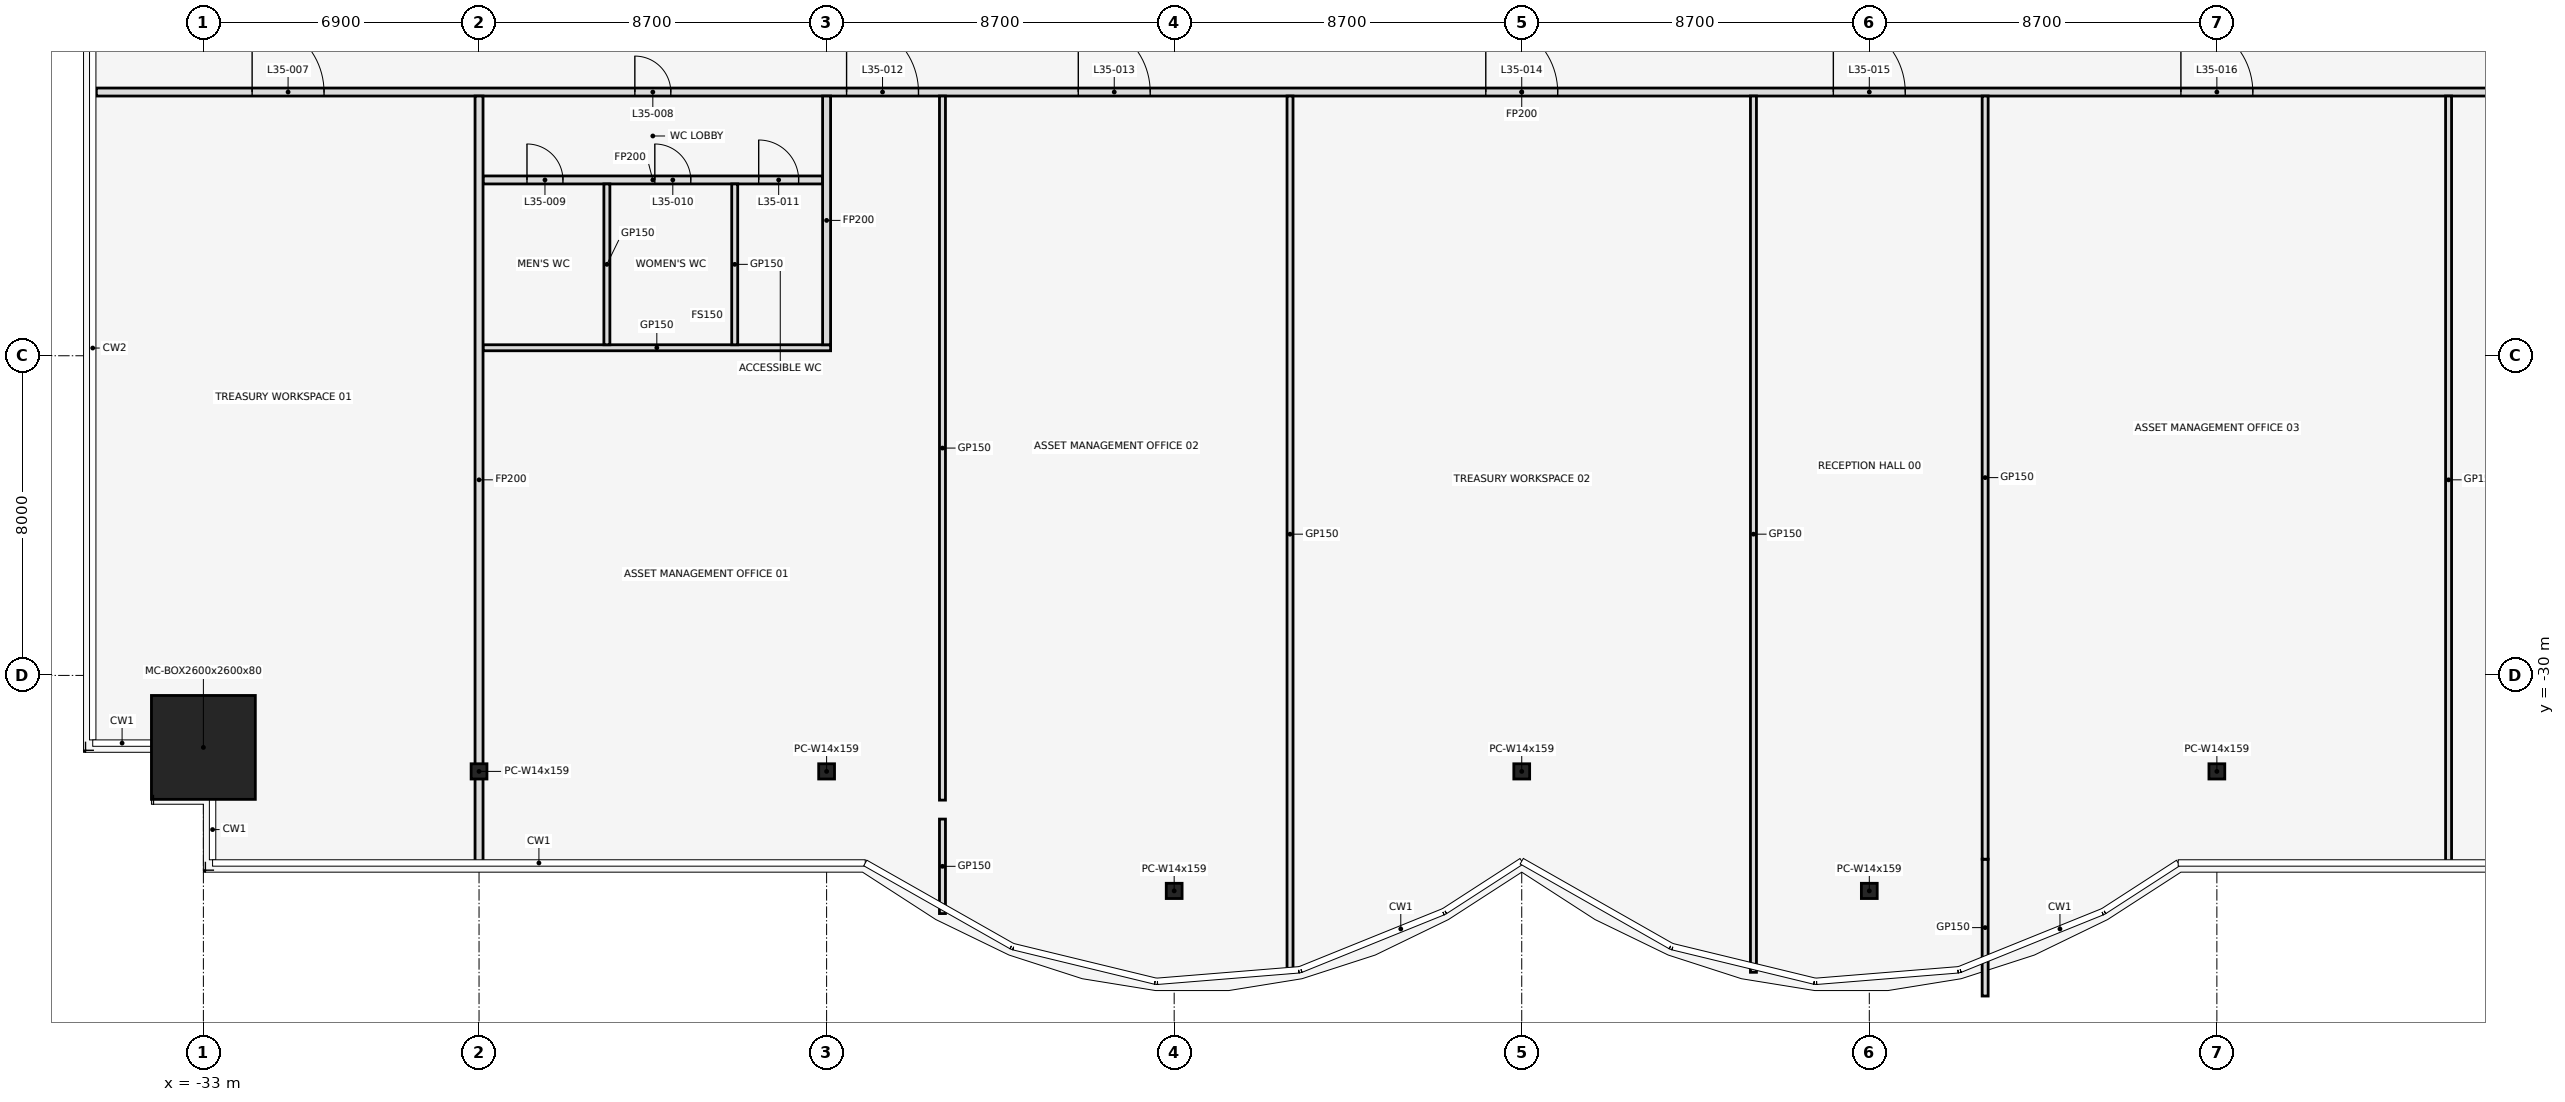
"""IFC4 building model, lengths in metres.
Left out: names, types, materials, properties, quantities, classifications, styles, units other than length and angle.
Written with IfcOpenShell. Run it as: python <this file> out.ifc"""

import sys

from ifc_helpers import new_model, si_unit, direction, frame, frame_2d, origin, origin_2d, place, context, subcontext, project, spatial, rectangle, hollow_rectangle, i_section, extrude, element, fill, save


model = new_model("IFC4")
c1 = context("Model", 3, precision=1e-05, world=origin(), true_north=direction((0.0, 1.0)))
c2 = subcontext(c1, "Body", "Model", "MODEL_VIEW")
j1 = project(units=[si_unit("LENGTHUNIT", "METRE"), si_unit("PLANEANGLEUNIT", "RADIAN")], contexts=[c1])
p1 = place(None, origin())
s1 = spatial("IfcSite", under=j1, at=p1, CompositionType="ELEMENT")
p2 = place(p1, origin())
s2 = spatial("IfcBuilding", under=s1, at=p2, CompositionType="ELEMENT")
p3 = place(p2, frame((0.0, 0.0, 160.9)))
s3 = spatial("IfcBuildingStorey", under=s2, at=p3, CompositionType="ELEMENT", Elevation=160.9)
p4 = place(p3, frame((-33.0, -31.802, 0.0), z_axis=(0.0, 0.0, 1.0), x_axis=(1.0, 0.0, 0.0)))
e1 = element("IfcColumn", 1, at=p4, inside=s3, PredefinedType="COLUMN", context=c2, shape_type="SweptSolid", body=[
    extrude(hollow_rectangle(XDim=2.6, YDim=2.6, WallThickness=0.08, at=origin_2d()), origin(), (0.0, 0.0, 1.0), 4.1),
])
for number, where, z_axis, x_axis in (
    (2, (-26.1, -32.402, 0.0), (0.0, 0.0, 1.0), (1.0, 0.0, 0.0)),
    (3, (-17.4, -32.402, 0.0), (0.0, 0.0, 1.0), (1.0, 0.0, 0.0)),
    (4, (-8.7, -35.393, 0.0), (0.0, 0.0, 1.0), (1.0, 0.0, 0.0)),
    (5, (0.0, -32.402, 0.0), (0.0, 0.0, 1.0), (1.0, 0.0, 0.0)),
    (6, (8.7, -35.393, 0.0), (0.0, 0.0, 1.0), (1.0, 0.0, 0.0)),
    (7, (17.4, -32.402, 0.0), (0.0, 0.0, 1.0), (1.0, 0.0, 0.0)),
):
    element("IfcColumn", number, at=place(p3, frame(where, z_axis=z_axis, x_axis=x_axis)), inside=s3, PredefinedType="COLUMN", context=c2, shape_type="SweptSolid", body=[
        extrude(i_section(OverallWidth=0.396, OverallDepth=0.381, WebThickness=0.019, FlangeThickness=0.03, at=origin_2d()), origin(), (0.0, 0.0, 1.0), 4.1),
    ])
p5 = place(p3, frame((-26.0, -21.8, 0.0), z_axis=(0.0, 0.0, 1.0), x_axis=(1.0, 0.0, 0.0)))
e8 = element("IfcWall", 8, at=p5, inside=s3, PredefinedType="PARTITIONING", context=c2, shape_type="SweptSolid", body=[
    extrude(rectangle(XDim=8.7, YDim=0.15, at=frame_2d((4.35, 0.0))), origin(), (0.0, 0.0, 1.0), 2.841),
])
p6 = place(p3, frame((-26.0, -17.6, 0.0), z_axis=(0.0, 0.0, 1.0), x_axis=(1.0, 0.0, 0.0)))
e9 = element("IfcWall", 9, at=p6, inside=s3, PredefinedType="PARTITIONING", context=c2, shape_type="SweptSolid", body=[
    extrude(rectangle(XDim=8.5, YDim=0.2, at=frame_2d((4.25, 0.0))), origin(), (0.0, 0.0, 1.0), 2.841),
])
p7 = place(p6, frame((1.1, 0.0, 0.0)))
e10 = element("IfcOpeningElement", 10, at=p7, cuts=e9, PredefinedType="OPENING", context=c2, shape_type="SweptSolid", body=[
    extrude(rectangle(XDim=0.9, YDim=2.1, at=frame_2d((0.45, 1.05))), frame((0.0, 0.112, 0.0), z_axis=(0.0, -1.0, 0.0), x_axis=(1.0, 0.0, 0.0)), (0.0, 0.0, 1.0), 0.224),
])
p8 = place(p6, frame((4.3, 0.0, 0.0)))
e11 = element("IfcOpeningElement", 11, at=p8, cuts=e9, PredefinedType="OPENING", context=c2, shape_type="SweptSolid", body=[
    extrude(rectangle(XDim=0.9, YDim=2.1, at=frame_2d((0.45, 1.05))), frame((0.0, 0.112, 0.0), z_axis=(0.0, -1.0, 0.0), x_axis=(1.0, 0.0, 0.0)), (0.0, 0.0, 1.0), 0.224),
])
p9 = place(p6, frame((6.9, 0.0, 0.0)))
e12 = element("IfcOpeningElement", 12, at=p9, cuts=e9, PredefinedType="OPENING", context=c2, shape_type="SweptSolid", body=[
    extrude(rectangle(XDim=1.0, YDim=2.1, at=frame_2d((0.5, 1.05))), frame((0.0, 0.112, 0.0), z_axis=(0.0, -1.0, 0.0), x_axis=(1.0, 0.0, 0.0)), (0.0, 0.0, 1.0), 0.224),
])
p10 = place(p3, frame((-35.68, -15.4, 0.0), z_axis=(0.0, 0.0, 1.0), x_axis=(1.0, 0.0, 0.0)))
e13 = element("IfcWall", 13, at=p10, inside=s3, PredefinedType="PARTITIONING", context=c2, shape_type="SweptSolid", body=[
    extrude(rectangle(XDim=71.36, YDim=0.2, at=frame_2d((35.68, 0.0))), origin(), (0.0, 0.0, 1.0), 2.841),
])
p11 = place(p10, frame((3.9, 0.0, 0.0)))
e14 = element("IfcOpeningElement", 14, at=p11, cuts=e13, PredefinedType="OPENING", context=c2, shape_type="SweptSolid", body=[
    extrude(rectangle(XDim=1.8, YDim=2.1, at=frame_2d((0.9, 1.05))), frame((0.0, 0.112, 0.0), z_axis=(0.0, -1.0, 0.0), x_axis=(1.0, 0.0, 0.0)), (0.0, 0.0, 1.0), 0.224),
])
p12 = place(p10, frame((13.48, 0.0, 0.0)))
e15 = element("IfcOpeningElement", 15, at=p12, cuts=e13, PredefinedType="OPENING", context=c2, shape_type="SweptSolid", body=[
    extrude(rectangle(XDim=0.9, YDim=2.1, at=frame_2d((0.45, 1.05))), frame((0.0, 0.112, 0.0), z_axis=(0.0, -1.0, 0.0), x_axis=(1.0, 0.0, 0.0)), (0.0, 0.0, 1.0), 0.224),
])
p13 = place(p10, frame((18.78, 0.0, 0.0)))
e16 = element("IfcOpeningElement", 16, at=p13, cuts=e13, PredefinedType="OPENING", context=c2, shape_type="SweptSolid", body=[
    extrude(rectangle(XDim=1.8, YDim=2.1, at=frame_2d((0.9, 1.05))), frame((0.0, 0.112, 0.0), z_axis=(0.0, -1.0, 0.0), x_axis=(1.0, 0.0, 0.0)), (0.0, 0.0, 1.0), 0.224),
])
p14 = place(p10, frame((24.58, 0.0, 0.0)))
e17 = element("IfcOpeningElement", 17, at=p14, cuts=e13, PredefinedType="OPENING", context=c2, shape_type="SweptSolid", body=[
    extrude(rectangle(XDim=1.8, YDim=2.1, at=frame_2d((0.9, 1.05))), frame((0.0, 0.112, 0.0), z_axis=(0.0, -1.0, 0.0), x_axis=(1.0, 0.0, 0.0)), (0.0, 0.0, 1.0), 0.224),
])
p15 = place(p10, frame((34.78, 0.0, 0.0)))
e18 = element("IfcOpeningElement", 18, at=p15, cuts=e13, PredefinedType="OPENING", context=c2, shape_type="SweptSolid", body=[
    extrude(rectangle(XDim=1.8, YDim=2.1, at=frame_2d((0.9, 1.05))), frame((0.0, 0.112, 0.0), z_axis=(0.0, -1.0, 0.0), x_axis=(1.0, 0.0, 0.0)), (0.0, 0.0, 1.0), 0.224),
])
p16 = place(p10, frame((43.48, 0.0, 0.0)))
e19 = element("IfcOpeningElement", 19, at=p16, cuts=e13, PredefinedType="OPENING", context=c2, shape_type="SweptSolid", body=[
    extrude(rectangle(XDim=1.8, YDim=2.1, at=frame_2d((0.9, 1.05))), frame((0.0, 0.112, 0.0), z_axis=(0.0, -1.0, 0.0), x_axis=(1.0, 0.0, 0.0)), (0.0, 0.0, 1.0), 0.224),
])
p17 = place(p10, frame((52.18, 0.0, 0.0)))
e20 = element("IfcOpeningElement", 20, at=p17, cuts=e13, PredefinedType="OPENING", context=c2, shape_type="SweptSolid", body=[
    extrude(rectangle(XDim=1.8, YDim=2.1, at=frame_2d((0.9, 1.05))), frame((0.0, 0.112, 0.0), z_axis=(0.0, -1.0, 0.0), x_axis=(1.0, 0.0, 0.0)), (0.0, 0.0, 1.0), 0.224),
])
p18 = place(p10, frame((64.18, 0.0, 0.0)))
e21 = element("IfcOpeningElement", 21, at=p18, cuts=e13, PredefinedType="OPENING", context=c2, shape_type="SweptSolid", body=[
    extrude(rectangle(XDim=1.8, YDim=2.1, at=frame_2d((0.9, 1.05))), frame((0.0, 0.112, 0.0), z_axis=(0.0, -1.0, 0.0), x_axis=(1.0, 0.0, 0.0)), (0.0, 0.0, 1.0), 0.224),
])
p19 = place(p3, frame((-26.1, -34.71, 0.0), z_axis=(0.0, 0.0, 1.0), x_axis=(0.0, 1.0, 0.0)))
e22 = element("IfcWall", 22, at=p19, inside=s3, PredefinedType="PARTITIONING", context=c2, shape_type="SweptSolid", body=[
    extrude(rectangle(XDim=19.21, YDim=0.2, at=frame_2d((9.605, 0.0))), origin(), (0.0, 0.0, 1.0), 2.841),
])
for number, where, z_axis, x_axis in (
    (23, (-22.9, -21.725, 0.0), (0.0, 0.0, 1.0), (0.0, 1.0, 0.0)),
    (24, (-19.7, -21.725, 0.0), (0.0, 0.0, 1.0), (0.0, 1.0, 0.0)),
):
    element("IfcWall", number, at=place(p3, frame(where, z_axis=z_axis, x_axis=x_axis)), inside=s3, PredefinedType="PARTITIONING", context=c2, shape_type="SweptSolid", body=[
        extrude(rectangle(XDim=4.025, YDim=0.15, at=frame_2d((2.013, 0.0))), origin(), (0.0, 0.0, 1.0), 2.841),
    ])
p20 = place(p3, frame((-17.4, -21.725, 0.0), z_axis=(0.0, 0.0, 1.0), x_axis=(0.0, 1.0, 0.0)))
e25 = element("IfcWall", 25, at=p20, inside=s3, PredefinedType="PARTITIONING", context=c2, shape_type="SweptSolid", body=[
    extrude(rectangle(XDim=6.225, YDim=0.2, at=frame_2d((3.113, 0.0))), origin(), (0.0, 0.0, 1.0), 2.841),
])
p21 = place(p3, frame((-14.5, -35.96, 0.0), z_axis=(0.0, 0.0, 1.0), x_axis=(0.0, 1.0, 0.0)))
e26 = element("IfcWall", 26, at=p21, inside=s3, PredefinedType="PARTITIONING", context=c2, shape_type="SweptSolid", body=[
    extrude(rectangle(XDim=2.364, YDim=0.15, at=frame_2d((1.182, 0.0))), origin(), (0.0, 0.0, 1.0), 2.841),
])
p22 = place(p3, frame((-14.5, -33.121, 0.0), z_axis=(0.0, 0.0, 1.0), x_axis=(0.0, 1.0, 0.0)))
e27 = element("IfcWall", 27, at=p22, inside=s3, PredefinedType="PARTITIONING", context=c2, shape_type="SweptSolid", body=[
    extrude(rectangle(XDim=17.621, YDim=0.15, at=frame_2d((8.811, 0.0))), origin(), (0.0, 0.0, 1.0), 2.841),
])
for number, where, z_axis, x_axis in (
    (28, (-5.8, -37.43, 0.0), (0.0, 0.0, 1.0), (0.0, 1.0, 0.0)),
    (29, (5.8, -37.43, 0.0), (0.0, 0.0, 1.0), (0.0, 1.0, 0.0)),
):
    element("IfcWall", number, at=place(p3, frame(where, z_axis=z_axis, x_axis=x_axis)), inside=s3, PredefinedType="PARTITIONING", context=c2, shape_type="SweptSolid", body=[
        extrude(rectangle(XDim=21.93, YDim=0.15, at=frame_2d((10.965, 0.0))), origin(), (0.0, 0.0, 1.0), 2.841),
    ])
p23 = place(p3, frame((11.6, -38.024, 0.0), z_axis=(0.0, 0.0, 1.0), x_axis=(0.0, 1.0, 0.0)))
e30 = element("IfcWall", 30, at=p23, inside=s3, PredefinedType="PARTITIONING", context=c2, shape_type="SweptSolid", body=[
    extrude(rectangle(XDim=3.425, YDim=0.15, at=frame_2d((1.712, 0.0))), origin(), (0.0, 0.0, 1.0), 2.841),
])
p24 = place(p3, frame((11.6, -34.599, 0.0), z_axis=(0.0, 0.0, 1.0), x_axis=(0.0, 1.0, 0.0)))
e31 = element("IfcWall", 31, at=p24, inside=s3, PredefinedType="PARTITIONING", context=c2, shape_type="SweptSolid", body=[
    extrude(rectangle(XDim=19.099, YDim=0.15, at=frame_2d((9.55, 0.0))), origin(), (0.0, 0.0, 1.0), 2.841),
])
p25 = place(p3, frame((23.2, -34.71, 0.0), z_axis=(0.0, 0.0, 1.0), x_axis=(0.0, 1.0, 0.0)))
e32 = element("IfcWall", 32, at=p25, inside=s3, PredefinedType="PARTITIONING", context=c2, shape_type="SweptSolid", body=[
    extrude(rectangle(XDim=19.21, YDim=0.15, at=frame_2d((9.605, 0.0))), origin(), (0.0, 0.0, 1.0), 2.841),
])
p26 = place(p11, origin())
e33 = element("IfcDoor", 33, at=p26, inside=s3, OperationType="SINGLE_SWING_LEFT", PredefinedType="DOOR", context=c2, shape_type="SweptSolid", body=[
    extrude(rectangle(XDim=1.8, YDim=2.1, at=frame_2d((0.9, 1.05))), frame((0.0, 0.025, 0.0), z_axis=(0.0, -1.0, 0.0), x_axis=(1.0, 0.0, 0.0)), (0.0, 0.0, 1.0), 0.05),
])
fill(e14, e33)
p27 = place(p12, frame((0.9, 0.0, 0.0), z_axis=(0.0, 0.0, 1.0), x_axis=(-1.0, 0.0, 0.0)))
e34 = element("IfcDoor", 34, at=p27, inside=s3, OperationType="SINGLE_SWING_RIGHT", PredefinedType="DOOR", context=c2, shape_type="SweptSolid", body=[
    extrude(rectangle(XDim=0.9, YDim=2.1, at=frame_2d((0.45, 1.05))), frame((0.0, 0.025, 0.0), z_axis=(0.0, -1.0, 0.0), x_axis=(1.0, 0.0, 0.0)), (0.0, 0.0, 1.0), 0.05),
])
fill(e15, e34)
p28 = place(p7, frame((0.9, 0.0, 0.0), z_axis=(0.0, 0.0, 1.0), x_axis=(-1.0, 0.0, 0.0)))
e35 = element("IfcDoor", 35, at=p28, inside=s3, OperationType="SINGLE_SWING_RIGHT", PredefinedType="DOOR", context=c2, shape_type="SweptSolid", body=[
    extrude(rectangle(XDim=0.9, YDim=2.1, at=frame_2d((0.45, 1.05))), frame((0.0, 0.025, 0.0), z_axis=(0.0, -1.0, 0.0), x_axis=(1.0, 0.0, 0.0)), (0.0, 0.0, 1.0), 0.05),
])
fill(e10, e35)
p29 = place(p8, frame((0.9, 0.0, 0.0), z_axis=(0.0, 0.0, 1.0), x_axis=(-1.0, 0.0, 0.0)))
e36 = element("IfcDoor", 36, at=p29, inside=s3, OperationType="SINGLE_SWING_LEFT", PredefinedType="DOOR", context=c2, shape_type="SweptSolid", body=[
    extrude(rectangle(XDim=0.9, YDim=2.1, at=frame_2d((0.45, 1.05))), frame((0.0, 0.025, 0.0), z_axis=(0.0, -1.0, 0.0), x_axis=(1.0, 0.0, 0.0)), (0.0, 0.0, 1.0), 0.05),
])
fill(e11, e36)
p30 = place(p9, frame((1.0, 0.0, 0.0), z_axis=(0.0, 0.0, 1.0), x_axis=(-1.0, 0.0, 0.0)))
e37 = element("IfcDoor", 37, at=p30, inside=s3, OperationType="SINGLE_SWING_RIGHT", PredefinedType="DOOR", context=c2, shape_type="SweptSolid", body=[
    extrude(rectangle(XDim=1.0, YDim=2.1, at=frame_2d((0.5, 1.05))), frame((0.0, 0.025, 0.0), z_axis=(0.0, -1.0, 0.0), x_axis=(1.0, 0.0, 0.0)), (0.0, 0.0, 1.0), 0.05),
])
fill(e12, e37)
p31 = place(p13, origin())
e38 = element("IfcDoor", 38, at=p31, inside=s3, OperationType="SINGLE_SWING_LEFT", PredefinedType="DOOR", context=c2, shape_type="SweptSolid", body=[
    extrude(rectangle(XDim=1.8, YDim=2.1, at=frame_2d((0.9, 1.05))), frame((0.0, 0.025, 0.0), z_axis=(0.0, -1.0, 0.0), x_axis=(1.0, 0.0, 0.0)), (0.0, 0.0, 1.0), 0.05),
])
fill(e16, e38)
p32 = place(p14, origin())
e39 = element("IfcDoor", 39, at=p32, inside=s3, OperationType="SINGLE_SWING_LEFT", PredefinedType="DOOR", context=c2, shape_type="SweptSolid", body=[
    extrude(rectangle(XDim=1.8, YDim=2.1, at=frame_2d((0.9, 1.05))), frame((0.0, 0.025, 0.0), z_axis=(0.0, -1.0, 0.0), x_axis=(1.0, 0.0, 0.0)), (0.0, 0.0, 1.0), 0.05),
])
fill(e17, e39)
p33 = place(p15, origin())
e40 = element("IfcDoor", 40, at=p33, inside=s3, OperationType="SINGLE_SWING_LEFT", PredefinedType="DOOR", context=c2, shape_type="SweptSolid", body=[
    extrude(rectangle(XDim=1.8, YDim=2.1, at=frame_2d((0.9, 1.05))), frame((0.0, 0.025, 0.0), z_axis=(0.0, -1.0, 0.0), x_axis=(1.0, 0.0, 0.0)), (0.0, 0.0, 1.0), 0.05),
])
fill(e18, e40)
p34 = place(p16, origin())
e41 = element("IfcDoor", 41, at=p34, inside=s3, OperationType="SINGLE_SWING_LEFT", PredefinedType="DOOR", context=c2, shape_type="SweptSolid", body=[
    extrude(rectangle(XDim=1.8, YDim=2.1, at=frame_2d((0.9, 1.05))), frame((0.0, 0.025, 0.0), z_axis=(0.0, -1.0, 0.0), x_axis=(1.0, 0.0, 0.0)), (0.0, 0.0, 1.0), 0.05),
])
fill(e19, e41)
p35 = place(p17, origin())
e42 = element("IfcDoor", 42, at=p35, inside=s3, OperationType="SINGLE_SWING_LEFT", PredefinedType="DOOR", context=c2, shape_type="SweptSolid", body=[
    extrude(rectangle(XDim=1.8, YDim=2.1, at=frame_2d((0.9, 1.05))), frame((0.0, 0.025, 0.0), z_axis=(0.0, -1.0, 0.0), x_axis=(1.0, 0.0, 0.0)), (0.0, 0.0, 1.0), 0.05),
])
fill(e20, e42)
save(model, sys.argv[1])
